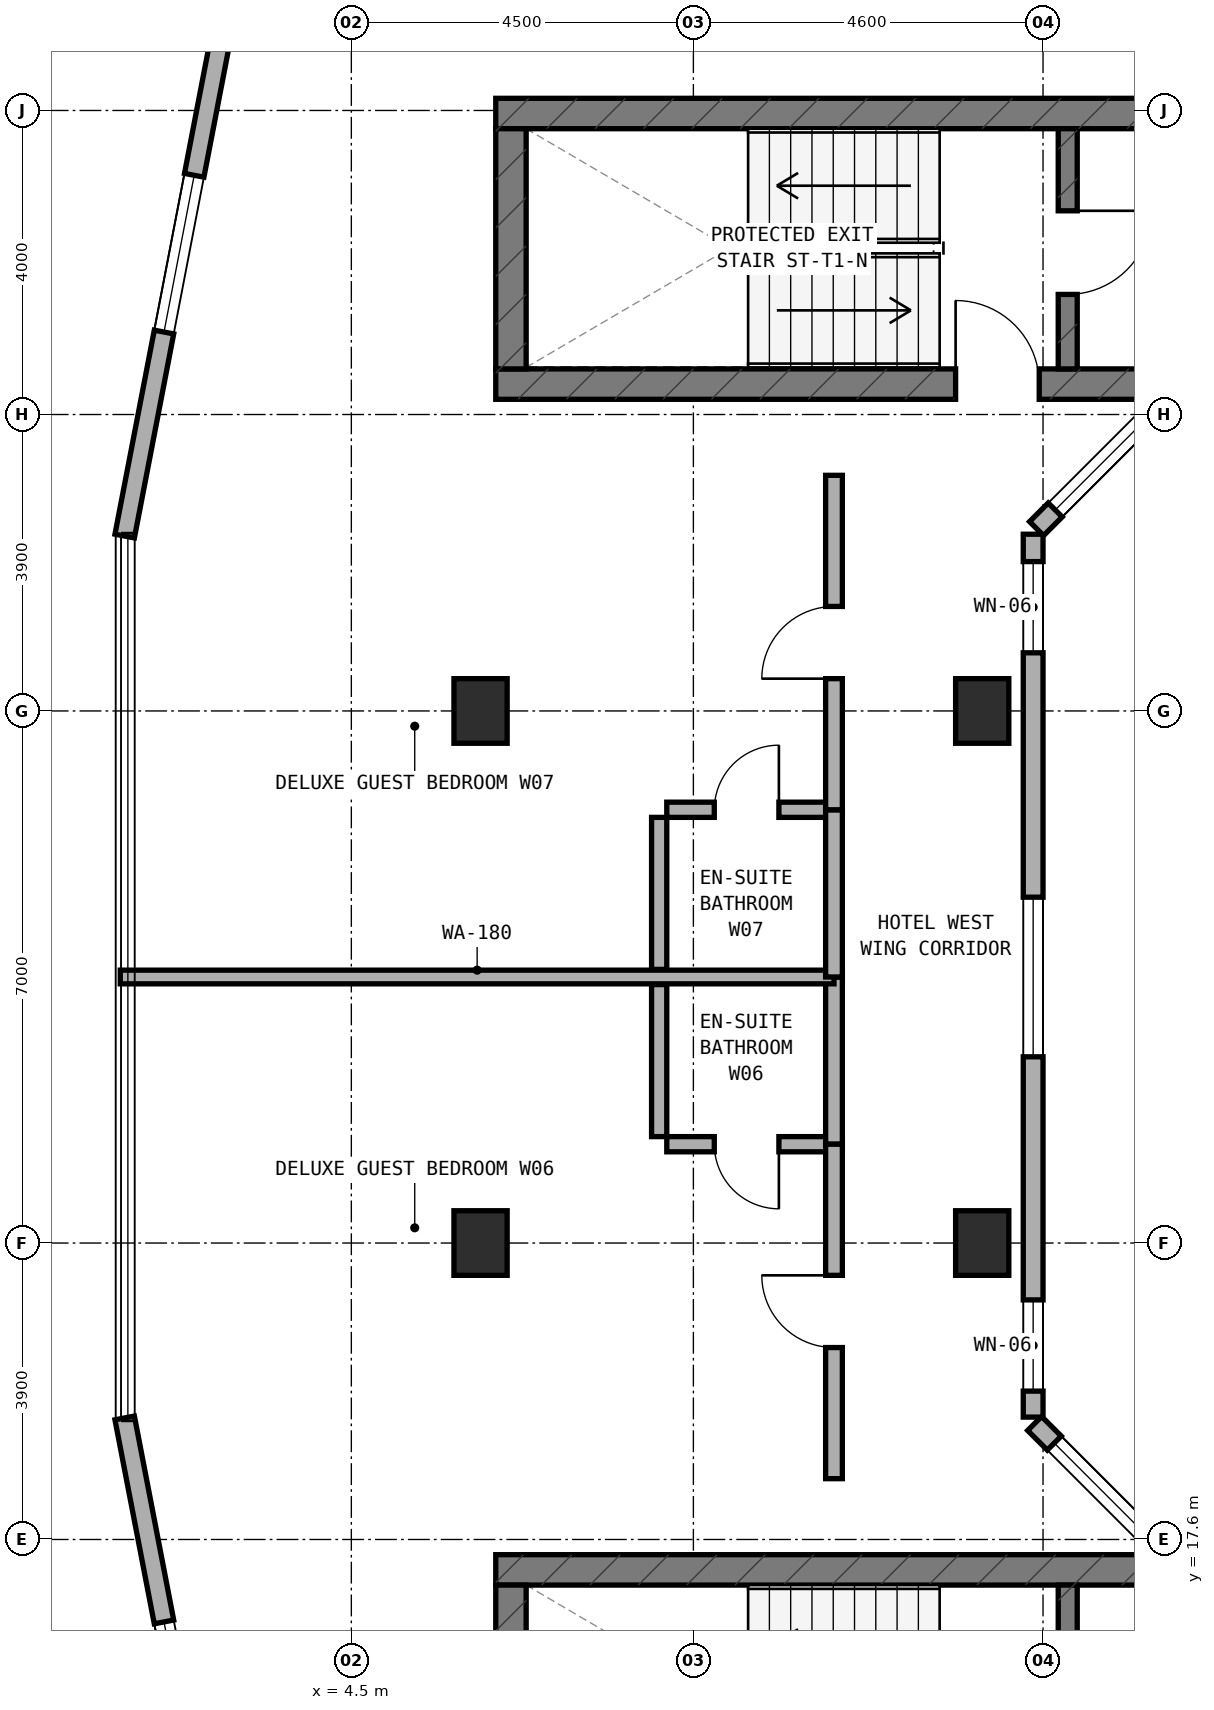
"""IFC4 building model, lengths in metres.
Left out: names, types, materials, properties, quantities, classifications, styles, units other than length and angle.
Written with IfcOpenShell. Run it as: python <this file> out.ifc"""

import sys

from ifc_helpers import new_model, si_unit, direction, frame, frame_2d, origin, origin_2d, place, context, subcontext, project, spatial, rectangle, extrude, element, fill, save


model = new_model("IFC4")
c1 = context("Model", 3, precision=1e-05, world=origin(), true_north=direction((0.0, 1.0)))
c2 = subcontext(c1, "Body", "Model", "MODEL_VIEW")
j1 = project(units=[si_unit("LENGTHUNIT", "METRE"), si_unit("PLANEANGLEUNIT", "RADIAN")], contexts=[c1])
p1 = place(None, origin())
s1 = spatial("IfcSite", under=j1, at=p1, CompositionType="ELEMENT")
p2 = place(p1, origin())
s2 = spatial("IfcBuilding", under=s1, at=p2, CompositionType="ELEMENT")
p3 = place(p2, frame((0.0, 0.0, 195.5)))
s3 = spatial("IfcBuildingStorey", under=s2, at=p3, CompositionType="ELEMENT", Elevation=195.5)
p4 = place(p3, frame((6.4, 32.8, 0.0), z_axis=(0.0, 0.0, 1.0), x_axis=(1.0, 0.0, 0.0)))
e1 = element("IfcWall", 1, at=p4, inside=s3, PredefinedType="SHEAR", context=c2, shape_type="SweptSolid", body=[
    extrude(rectangle(XDim=24.4, YDim=0.4, at=frame_2d((12.2, 0.0))), origin(), (0.0, 0.0, 1.0), 3.6),
])
p5 = place(p4, frame((6.05, 0.0, 0.0)))
e2 = element("IfcOpeningElement", 2, at=p5, cuts=e1, PredefinedType="OPENING", context=c2, shape_type="SweptSolid", body=[
    extrude(rectangle(XDim=1.1, YDim=2.15, at=frame_2d((0.55, 1.075))), frame((0.0, 0.21, 0.0), z_axis=(0.0, -1.0, 0.0), x_axis=(1.0, 0.0, 0.0)), (0.0, 0.0, 1.0), 0.42),
])
p6 = place(p3, frame((6.4, 36.36, 0.0), z_axis=(0.0, 0.0, 1.0), x_axis=(1.0, 0.0, 0.0)))
e3 = element("IfcWall", 3, at=p6, inside=s3, PredefinedType="SHEAR", context=c2, shape_type="SweptSolid", body=[
    extrude(rectangle(XDim=24.4, YDim=0.4, at=frame_2d((12.2, 0.0))), origin(), (0.0, 0.0, 1.0), 3.6),
])
p7 = place(p6, frame((9.15, 0.0, 0.0)))
e4 = element("IfcOpeningElement", 4, at=p7, cuts=e3, PredefinedType="OPENING", context=c2, shape_type="SweptSolid", body=[
    extrude(rectangle(XDim=1.2, YDim=2.15, at=frame_2d((0.6, 1.075))), frame((0.0, 0.21, 0.0), z_axis=(0.0, -1.0, 0.0), x_axis=(1.0, 0.0, 0.0)), (0.0, 0.0, 1.0), 0.42),
])
p8 = place(p6, frame((19.2, 0.0, 0.0)))
e5 = element("IfcOpeningElement", 5, at=p8, cuts=e3, PredefinedType="OPENING", context=c2, shape_type="SweptSolid", body=[
    extrude(rectangle(XDim=0.85, YDim=2.1, at=frame_2d((0.425, 1.05))), frame((0.0, 0.21, 0.0), z_axis=(0.0, -1.0, 0.0), x_axis=(1.0, 0.0, 0.0)), (0.0, 0.0, 1.0), 0.42),
])
p9 = place(p6, frame((16.94, 0.0, 0.0)))
e6 = element("IfcOpeningElement", 6, at=p9, cuts=e3, PredefinedType="OPENING", context=c2, shape_type="SweptSolid", body=[
    extrude(rectangle(XDim=0.85, YDim=2.1, at=frame_2d((0.425, 1.05))), frame((0.0, 0.21, 0.0), z_axis=(0.0, -1.0, 0.0), x_axis=(1.0, 0.0, 0.0)), (0.0, 0.0, 1.0), 0.42),
])
p10 = place(p3, frame((6.6, 33.0, 0.0), z_axis=(0.0, 0.0, 1.0), x_axis=(0.0, 1.0, 0.0)))
e7 = element("IfcWall", 7, at=p10, inside=s3, PredefinedType="SHEAR", context=c2, shape_type="SweptSolid", body=[
    extrude(rectangle(XDim=3.16, YDim=0.4, at=frame_2d((1.58, 0.0))), origin(), (0.0, 0.0, 1.0), 3.6),
])
p11 = place(p3, frame((13.925, 33.0, 0.0), z_axis=(0.0, 0.0, 1.0), x_axis=(0.0, 1.0, 0.0)))
e8 = element("IfcWall", 8, at=p11, inside=s3, PredefinedType="STANDARD", context=c2, shape_type="SweptSolid", body=[
    extrude(rectangle(XDim=3.16, YDim=0.25, at=frame_2d((1.58, 0.0))), origin(), (0.0, 0.0, 1.0), 3.28),
])
p12 = place(p11, frame((0.98, 0.0, 0.0)))
e9 = element("IfcOpeningElement", 9, at=p12, cuts=e8, PredefinedType="OPENING", context=c2, shape_type="SweptSolid", body=[
    extrude(rectangle(XDim=1.1, YDim=2.15, at=frame_2d((0.55, 1.075))), frame((0.0, 0.135, 0.0), z_axis=(0.0, -1.0, 0.0), x_axis=(1.0, 0.0, 0.0)), (0.0, 0.0, 1.0), 0.27),
])
p13 = place(p3, frame((6.4, 17.2, 0.0), z_axis=(0.0, 0.0, 1.0), x_axis=(1.0, 0.0, 0.0)))
e10 = element("IfcWall", 10, at=p13, inside=s3, PredefinedType="SHEAR", context=c2, shape_type="SweptSolid", body=[
    extrude(rectangle(XDim=24.4, YDim=0.4, at=frame_2d((12.2, 0.0))), origin(), (0.0, 0.0, 1.0), 3.6),
])
p14 = place(p3, frame((6.6, 13.84, 0.0), z_axis=(0.0, 0.0, 1.0), x_axis=(0.0, 1.0, 0.0)))
e11 = element("IfcWall", 11, at=p14, inside=s3, PredefinedType="SHEAR", context=c2, shape_type="SweptSolid", body=[
    extrude(rectangle(XDim=3.16, YDim=0.4, at=frame_2d((1.58, 0.0))), origin(), (0.0, 0.0, 1.0), 3.6),
])
p15 = place(p3, frame((13.925, 13.84, 0.0), z_axis=(0.0, 0.0, 1.0), x_axis=(0.0, 1.0, 0.0)))
e12 = element("IfcWall", 12, at=p15, inside=s3, PredefinedType="STANDARD", context=c2, shape_type="SweptSolid", body=[
    extrude(rectangle(XDim=3.16, YDim=0.25, at=frame_2d((1.58, 0.0))), origin(), (0.0, 0.0, 1.0), 3.28),
])
p16 = place(p15, frame((0.98, 0.0, 0.0)))
e13 = element("IfcOpeningElement", 13, at=p16, cuts=e12, PredefinedType="OPENING", context=c2, shape_type="SweptSolid", body=[
    extrude(rectangle(XDim=1.1, YDim=2.15, at=frame_2d((0.55, 1.075))), frame((0.0, 0.135, 0.0), z_axis=(0.0, -1.0, 0.0), x_axis=(1.0, 0.0, 0.0)), (0.0, 0.0, 1.0), 0.27),
])
for number, where, z_axis, x_axis in (
    (14, (6.2, 21.5, 0.0), (0.0, 0.0, 1.0), (1.0, 0.0, 0.0)),
    (15, (6.2, 28.5, 0.0), (0.0, 0.0, 1.0), (1.0, 0.0, 0.0)),
    (16, (12.8, 21.5, 0.0), (0.0, 0.0, 1.0), (1.0, 0.0, 0.0)),
    (17, (12.8, 28.5, 0.0), (0.0, 0.0, 1.0), (1.0, 0.0, 0.0)),
):
    element("IfcColumn", number, at=place(p3, frame(where, z_axis=z_axis, x_axis=x_axis)), inside=s3, PredefinedType="COLUMN", context=c2, shape_type="SweptSolid", body=[
        extrude(rectangle(XDim=0.7, YDim=0.85, at=origin_2d()), origin(), (0.0, 0.0, 1.0), 3.6),
    ])
p17 = place(p3, frame((15.278, 17.338, 0.0), z_axis=(0.0, 0.0, 1.0), x_axis=(-0.707106781187, 0.707106781187, 0.0)))
e18 = element("IfcWall", 18, at=p17, inside=s3, PredefinedType="STANDARD", context=c2, shape_type="SweptSolid", body=[
    extrude(rectangle(XDim=2.529, YDim=0.26, at=frame_2d((1.264, 0.0))), origin(), (0.0, 0.0, 1.0), 3.28),
])
p18 = place(p17, frame((0.364, 0.0, 0.85)))
e19 = element("IfcOpeningElement", 19, at=p18, cuts=e18, PredefinedType="OPENING", context=c2, shape_type="SweptSolid", body=[
    extrude(rectangle(XDim=1.8, YDim=1.5, at=frame_2d((0.9, 0.75))), frame((0.0, 0.14, 0.0), z_axis=(0.0, -1.0, 0.0), x_axis=(1.0, 0.0, 0.0)), (0.0, 0.0, 1.0), 0.28),
])
p19 = place(p3, frame((13.47, 19.21, 0.0), z_axis=(0.0, 0.0, 1.0), x_axis=(0.0, 1.0, 0.0)))
e20 = element("IfcWall", 20, at=p19, inside=s3, PredefinedType="STANDARD", context=c2, shape_type="SweptSolid", body=[
    extrude(rectangle(XDim=11.615, YDim=0.26, at=frame_2d((5.808, 0.0))), origin(), (0.0, 0.0, 1.0), 3.28),
])
p20 = place(p19, frame((0.342, 0.0, 0.5)))
e21 = element("IfcOpeningElement", 21, at=p20, cuts=e20, PredefinedType="OPENING", context=c2, shape_type="SweptSolid", body=[
    extrude(rectangle(XDim=1.2, YDim=1.9, at=frame_2d((0.6, 0.95))), frame((0.0, 0.14, 0.0), z_axis=(0.0, -1.0, 0.0), x_axis=(1.0, 0.0, 0.0)), (0.0, 0.0, 1.0), 0.28),
])
p21 = place(p19, frame((4.74, 0.0, 0.85)))
e22 = element("IfcOpeningElement", 22, at=p21, cuts=e20, PredefinedType="OPENING", context=c2, shape_type="SweptSolid", body=[
    extrude(rectangle(XDim=2.1, YDim=1.5, at=frame_2d((1.05, 0.75))), frame((0.0, 0.14, 0.0), z_axis=(0.0, -1.0, 0.0), x_axis=(1.0, 0.0, 0.0)), (0.0, 0.0, 1.0), 0.28),
])
p22 = place(p19, frame((10.055, 0.0, 0.5)))
e23 = element("IfcOpeningElement", 23, at=p22, cuts=e20, PredefinedType="OPENING", context=c2, shape_type="SweptSolid", body=[
    extrude(rectangle(XDim=1.2, YDim=1.9, at=frame_2d((0.6, 0.95))), frame((0.0, 0.14, 0.0), z_axis=(0.0, -1.0, 0.0), x_axis=(1.0, 0.0, 0.0)), (0.0, 0.0, 1.0), 0.28),
])
p23 = place(p3, frame((13.515, 30.899, 0.0), z_axis=(0.0, 0.0, 1.0), x_axis=(0.707106781187, 0.707106781187, 0.0)))
e24 = element("IfcWall", 24, at=p23, inside=s3, PredefinedType="STANDARD", context=c2, shape_type="SweptSolid", body=[
    extrude(rectangle(XDim=2.493, YDim=0.26, at=frame_2d((1.247, 0.0))), origin(), (0.0, 0.0, 1.0), 3.28),
])
p24 = place(p23, frame((0.347, 0.0, 0.85)))
e25 = element("IfcOpeningElement", 25, at=p24, cuts=e24, PredefinedType="OPENING", context=c2, shape_type="SweptSolid", body=[
    extrude(rectangle(XDim=1.8, YDim=1.5, at=frame_2d((0.9, 0.75))), frame((0.0, 0.14, 0.0), z_axis=(0.0, -1.0, 0.0), x_axis=(1.0, 0.0, 0.0)), (0.0, 0.0, 1.0), 0.28),
])
p25 = place(p3, frame((3.23, 39.683, 0.0), z_axis=(0.0, 0.0, 1.0), x_axis=(-0.189254809039, -0.98192801022, 0.0)))
e26 = element("IfcWall", 26, at=p25, inside=s3, PredefinedType="STANDARD", context=c2, shape_type="SweptSolid", body=[
    extrude(rectangle(XDim=9.046, YDim=0.26, at=frame_2d((4.523, 0.0))), origin(), (0.0, 0.0, 1.0), 3.28),
])
p26 = place(p25, frame((4.212, 0.0, 0.85)))
e27 = element("IfcOpeningElement", 27, at=p26, cuts=e26, PredefinedType="OPENING", context=c2, shape_type="SweptSolid", body=[
    extrude(rectangle(XDim=2.1, YDim=1.5, at=frame_2d((1.05, 0.75))), frame((0.0, 0.14, 0.0), z_axis=(0.0, -1.0, 0.0), x_axis=(1.0, 0.0, 0.0)), (0.0, 0.0, 1.0), 0.28),
])
p27 = place(p3, frame((1.518, 19.199, 0.0), z_axis=(0.0, 0.0, 1.0), x_axis=(0.189254809039, -0.98192801022, 0.0)))
e28 = element("IfcWall", 28, at=p27, inside=s3, PredefinedType="STANDARD", context=c2, shape_type="SweptSolid", body=[
    extrude(rectangle(XDim=9.046, YDim=0.26, at=frame_2d((4.523, 0.0))), origin(), (0.0, 0.0, 1.0), 3.28),
])
p28 = place(p27, frame((2.733, 0.0, 0.85)))
e29 = element("IfcOpeningElement", 29, at=p28, cuts=e28, PredefinedType="OPENING", context=c2, shape_type="SweptSolid", body=[
    extrude(rectangle(XDim=2.1, YDim=1.5, at=frame_2d((1.05, 0.75))), frame((0.0, 0.14, 0.0), z_axis=(0.0, -1.0, 0.0), x_axis=(1.0, 0.0, 0.0)), (0.0, 0.0, 1.0), 0.28),
])
p29 = place(p3, frame((8.65, 22.8, 0.0), z_axis=(0.0, 0.0, 1.0), x_axis=(1.0, 0.0, 0.0)))
e30 = element("IfcWall", 30, at=p29, inside=s3, PredefinedType="PLUMBINGWALL", context=c2, shape_type="SweptSolid", body=[
    extrude(rectangle(XDim=2.1, YDim=0.2, at=frame_2d((1.05, 0.0))), origin(), (0.0, 0.0, 1.0), 3.28),
])
p30 = place(p29, frame((0.625, 0.0, 0.0)))
e31 = element("IfcOpeningElement", 31, at=p30, cuts=e30, PredefinedType="OPENING", context=c2, shape_type="SweptSolid", body=[
    extrude(rectangle(XDim=0.85, YDim=2.1, at=frame_2d((0.425, 1.05))), frame((0.0, 0.11, 0.0), z_axis=(0.0, -1.0, 0.0), x_axis=(1.0, 0.0, 0.0)), (0.0, 0.0, 1.0), 0.22),
])
p31 = place(p3, frame((8.55, 22.9, 0.0), z_axis=(0.0, 0.0, 1.0), x_axis=(0.0, 1.0, 0.0)))
e32 = element("IfcWall", 32, at=p31, inside=s3, PredefinedType="PLUMBINGWALL", context=c2, shape_type="SweptSolid", body=[
    extrude(rectangle(XDim=2.0, YDim=0.2, at=frame_2d((1.0, 0.0))), origin(), (0.0, 0.0, 1.0), 3.28),
])
p32 = place(p3, frame((10.85, 22.8, 0.0), z_axis=(0.0, 0.0, 1.0), x_axis=(0.0, 1.0, 0.0)))
e33 = element("IfcWall", 33, at=p32, inside=s3, PredefinedType="SOLIDWALL", context=c2, shape_type="SweptSolid", body=[
    extrude(rectangle(XDim=2.2, YDim=0.22, at=frame_2d((1.1, 0.0))), origin(), (0.0, 0.0, 1.0), 3.28),
])
p33 = place(p3, frame((10.85, 18.4, 0.0), z_axis=(0.0, 0.0, 1.0), x_axis=(0.0, 1.0, 0.0)))
e34 = element("IfcWall", 34, at=p33, inside=s3, PredefinedType="SOLIDWALL", context=c2, shape_type="SweptSolid", body=[
    extrude(rectangle(XDim=4.4, YDim=0.22, at=frame_2d((2.2, 0.0))), origin(), (0.0, 0.0, 1.0), 2.955),
])
p34 = place(p33, frame((1.725, 0.0, 0.0)))
e35 = element("IfcOpeningElement", 35, at=p34, cuts=e34, PredefinedType="OPENING", context=c2, shape_type="SweptSolid", body=[
    extrude(rectangle(XDim=0.95, YDim=2.1, at=frame_2d((0.475, 1.05))), frame((0.0, 0.12, 0.0), z_axis=(0.0, -1.0, 0.0), x_axis=(1.0, 0.0, 0.0)), (0.0, 0.0, 1.0), 0.24),
])
p35 = place(p3, frame((1.46, 25.0, 0.0), z_axis=(0.0, 0.0, 1.0), x_axis=(1.0, 0.0, 0.0)))
e36 = element("IfcWall", 36, at=p35, inside=s3, PredefinedType="SOLIDWALL", context=c2, shape_type="SweptSolid", body=[
    extrude(rectangle(XDim=9.39, YDim=0.18, at=frame_2d((4.695, 0.0))), origin(), (0.0, 0.0, 1.0), 2.895),
])
p36 = place(p3, frame((8.65, 27.2, 0.0), z_axis=(0.0, 0.0, 1.0), x_axis=(1.0, 0.0, 0.0)))
e37 = element("IfcWall", 37, at=p36, inside=s3, PredefinedType="PLUMBINGWALL", context=c2, shape_type="SweptSolid", body=[
    extrude(rectangle(XDim=2.1, YDim=0.2, at=frame_2d((1.05, 0.0))), origin(), (0.0, 0.0, 1.0), 3.28),
])
p37 = place(p36, frame((0.625, 0.0, 0.0)))
e38 = element("IfcOpeningElement", 38, at=p37, cuts=e37, PredefinedType="OPENING", context=c2, shape_type="SweptSolid", body=[
    extrude(rectangle(XDim=0.85, YDim=2.1, at=frame_2d((0.425, 1.05))), frame((0.0, 0.11, 0.0), z_axis=(0.0, -1.0, 0.0), x_axis=(1.0, 0.0, 0.0)), (0.0, 0.0, 1.0), 0.22),
])
p38 = place(p3, frame((8.55, 25.1, 0.0), z_axis=(0.0, 0.0, 1.0), x_axis=(0.0, 1.0, 0.0)))
e39 = element("IfcWall", 39, at=p38, inside=s3, PredefinedType="PLUMBINGWALL", context=c2, shape_type="SweptSolid", body=[
    extrude(rectangle(XDim=2.0, YDim=0.2, at=frame_2d((1.0, 0.0))), origin(), (0.0, 0.0, 1.0), 3.28),
])
p39 = place(p3, frame((10.85, 25.0, 0.0), z_axis=(0.0, 0.0, 1.0), x_axis=(0.0, 1.0, 0.0)))
e40 = element("IfcWall", 40, at=p39, inside=s3, PredefinedType="SOLIDWALL", context=c2, shape_type="SweptSolid", body=[
    extrude(rectangle(XDim=2.2, YDim=0.22, at=frame_2d((1.1, 0.0))), origin(), (0.0, 0.0, 1.0), 3.28),
])
p40 = place(p3, frame((10.85, 27.2, 0.0), z_axis=(0.0, 0.0, 1.0), x_axis=(0.0, 1.0, 0.0)))
e41 = element("IfcWall", 41, at=p40, inside=s3, PredefinedType="SOLIDWALL", context=c2, shape_type="SweptSolid", body=[
    extrude(rectangle(XDim=4.4, YDim=0.22, at=frame_2d((2.2, 0.0))), origin(), (0.0, 0.0, 1.0), 2.955),
])
p41 = place(p40, frame((1.725, 0.0, 0.0)))
e42 = element("IfcOpeningElement", 42, at=p41, cuts=e41, PredefinedType="OPENING", context=c2, shape_type="SweptSolid", body=[
    extrude(rectangle(XDim=0.95, YDim=2.1, at=frame_2d((0.475, 1.05))), frame((0.0, 0.12, 0.0), z_axis=(0.0, -1.0, 0.0), x_axis=(1.0, 0.0, 0.0)), (0.0, 0.0, 1.0), 0.24),
])
p42 = place(p18, origin())
e43 = element("IfcWindow", 43, at=p42, inside=s3, PartitioningType="SINGLE_PANEL", PredefinedType="WINDOW", context=c2, shape_type="SweptSolid", body=[
    extrude(rectangle(XDim=1.8, YDim=1.5, at=frame_2d((0.9, 0.75))), frame((0.0, 0.03, 0.0), z_axis=(0.0, -1.0, 0.0), x_axis=(1.0, 0.0, 0.0)), (0.0, 0.0, 1.0), 0.06),
])
fill(e19, e43)
p43 = place(p20, origin())
e44 = element("IfcWindow", 44, at=p43, inside=s3, PartitioningType="SINGLE_PANEL", PredefinedType="WINDOW", context=c2, shape_type="SweptSolid", body=[
    extrude(rectangle(XDim=1.2, YDim=1.9, at=frame_2d((0.6, 0.95))), frame((0.0, 0.03, 0.0), z_axis=(0.0, -1.0, 0.0), x_axis=(1.0, 0.0, 0.0)), (0.0, 0.0, 1.0), 0.06),
])
fill(e21, e44)
p44 = place(p21, origin())
e45 = element("IfcWindow", 45, at=p44, inside=s3, PartitioningType="SINGLE_PANEL", PredefinedType="WINDOW", context=c2, shape_type="SweptSolid", body=[
    extrude(rectangle(XDim=2.1, YDim=1.5, at=frame_2d((1.05, 0.75))), frame((0.0, 0.03, 0.0), z_axis=(0.0, -1.0, 0.0), x_axis=(1.0, 0.0, 0.0)), (0.0, 0.0, 1.0), 0.06),
])
fill(e22, e45)
p45 = place(p22, origin())
e46 = element("IfcWindow", 46, at=p45, inside=s3, PartitioningType="SINGLE_PANEL", PredefinedType="WINDOW", context=c2, shape_type="SweptSolid", body=[
    extrude(rectangle(XDim=1.2, YDim=1.9, at=frame_2d((0.6, 0.95))), frame((0.0, 0.03, 0.0), z_axis=(0.0, -1.0, 0.0), x_axis=(1.0, 0.0, 0.0)), (0.0, 0.0, 1.0), 0.06),
])
fill(e23, e46)
p46 = place(p24, origin())
e47 = element("IfcWindow", 47, at=p46, inside=s3, PartitioningType="SINGLE_PANEL", PredefinedType="WINDOW", context=c2, shape_type="SweptSolid", body=[
    extrude(rectangle(XDim=1.8, YDim=1.5, at=frame_2d((0.9, 0.75))), frame((0.0, 0.03, 0.0), z_axis=(0.0, -1.0, 0.0), x_axis=(1.0, 0.0, 0.0)), (0.0, 0.0, 1.0), 0.06),
])
fill(e25, e47)
p47 = place(p26, origin())
e48 = element("IfcWindow", 48, at=p47, inside=s3, PartitioningType="SINGLE_PANEL", PredefinedType="WINDOW", context=c2, shape_type="SweptSolid", body=[
    extrude(rectangle(XDim=2.1, YDim=1.5, at=frame_2d((1.05, 0.75))), frame((0.0, 0.03, 0.0), z_axis=(0.0, -1.0, 0.0), x_axis=(1.0, 0.0, 0.0)), (0.0, 0.0, 1.0), 0.06),
])
fill(e27, e48)
p48 = place(p28, origin())
e49 = element("IfcWindow", 49, at=p48, inside=s3, PartitioningType="SINGLE_PANEL", PredefinedType="WINDOW", context=c2, shape_type="SweptSolid", body=[
    extrude(rectangle(XDim=2.1, YDim=1.5, at=frame_2d((1.05, 0.75))), frame((0.0, 0.03, 0.0), z_axis=(0.0, -1.0, 0.0), x_axis=(1.0, 0.0, 0.0)), (0.0, 0.0, 1.0), 0.06),
])
fill(e29, e49)
p49 = place(p12, frame((1.1, 0.0, 0.0), z_axis=(0.0, 0.0, 1.0), x_axis=(-1.0, 0.0, 0.0)))
e50 = element("IfcDoor", 50, at=p49, inside=s3, OperationType="SINGLE_SWING_LEFT", PredefinedType="DOOR", context=c2, shape_type="SweptSolid", body=[
    extrude(rectangle(XDim=1.1, YDim=2.15, at=frame_2d((0.55, 1.075))), frame((0.0, 0.025, 0.0), z_axis=(0.0, -1.0, 0.0), x_axis=(1.0, 0.0, 0.0)), (0.0, 0.0, 1.0), 0.05),
])
fill(e9, e50)
p50 = place(p5, origin())
e51 = element("IfcDoor", 51, at=p50, inside=s3, OperationType="SINGLE_SWING_LEFT", PredefinedType="DOOR", context=c2, shape_type="SweptSolid", body=[
    extrude(rectangle(XDim=1.1, YDim=2.15, at=frame_2d((0.55, 1.075))), frame((0.0, 0.025, 0.0), z_axis=(0.0, -1.0, 0.0), x_axis=(1.0, 0.0, 0.0)), (0.0, 0.0, 1.0), 0.05),
])
fill(e2, e51)
p51 = place(p30, frame((0.85, 0.0, 0.0), z_axis=(0.0, 0.0, 1.0), x_axis=(-1.0, 0.0, 0.0)))
e52 = element("IfcDoor", 52, at=p51, inside=s3, OperationType="SINGLE_SWING_LEFT", PredefinedType="DOOR", context=c2, shape_type="SweptSolid", body=[
    extrude(rectangle(XDim=0.85, YDim=2.1, at=frame_2d((0.425, 1.05))), frame((0.0, 0.025, 0.0), z_axis=(0.0, -1.0, 0.0), x_axis=(1.0, 0.0, 0.0)), (0.0, 0.0, 1.0), 0.05),
])
fill(e31, e52)
p52 = place(p34, origin())
e53 = element("IfcDoor", 53, at=p52, inside=s3, OperationType="SINGLE_SWING_RIGHT", PredefinedType="DOOR", context=c2, shape_type="SweptSolid", body=[
    extrude(rectangle(XDim=0.95, YDim=2.1, at=frame_2d((0.475, 1.05))), frame((0.0, 0.025, 0.0), z_axis=(0.0, -1.0, 0.0), x_axis=(1.0, 0.0, 0.0)), (0.0, 0.0, 1.0), 0.05),
])
fill(e35, e53)
p53 = place(p37, origin())
e54 = element("IfcDoor", 54, at=p53, inside=s3, OperationType="SINGLE_SWING_RIGHT", PredefinedType="DOOR", context=c2, shape_type="SweptSolid", body=[
    extrude(rectangle(XDim=0.85, YDim=2.1, at=frame_2d((0.425, 1.05))), frame((0.0, 0.025, 0.0), z_axis=(0.0, -1.0, 0.0), x_axis=(1.0, 0.0, 0.0)), (0.0, 0.0, 1.0), 0.05),
])
fill(e38, e54)
p54 = place(p41, origin())
e55 = element("IfcDoor", 55, at=p54, inside=s3, OperationType="SINGLE_SWING_LEFT", PredefinedType="DOOR", context=c2, shape_type="SweptSolid", body=[
    extrude(rectangle(XDim=0.95, YDim=2.1, at=frame_2d((0.475, 1.05))), frame((0.0, 0.025, 0.0), z_axis=(0.0, -1.0, 0.0), x_axis=(1.0, 0.0, 0.0)), (0.0, 0.0, 1.0), 0.05),
])
fill(e42, e55)
save(model, sys.argv[1])
